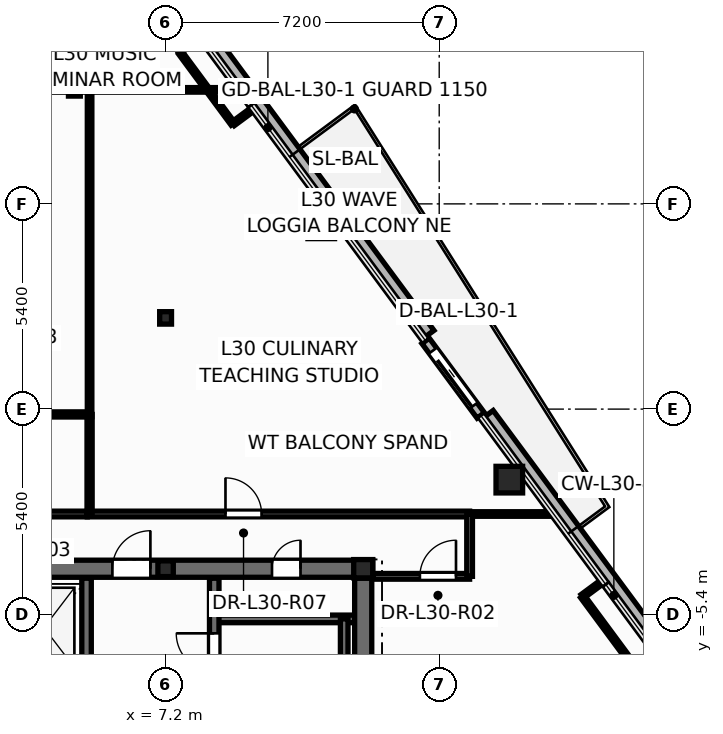
"""IFC4 building model, lengths in metres.
Left out: names, types, materials, properties, quantities, classifications, styles, units other than length and angle.
Written with IfcOpenShell. Run it as: python <this file> out.ifc"""

import sys

from ifc_helpers import new_model, si_unit, direction, frame, frame_2d, origin, origin_2d, place, context, subcontext, project, spatial, rectangle, hollow_circle, i_section, extrude, element, fill, save


model = new_model("IFC4")
c1 = context("Model", 3, precision=1e-05, world=origin(), true_north=direction((0.0, 1.0)))
c2 = subcontext(c1, "Body", "Model", "MODEL_VIEW")
j1 = project(units=[si_unit("LENGTHUNIT", "METRE"), si_unit("PLANEANGLEUNIT", "RADIAN")], contexts=[c1])
p1 = place(None, origin())
s1 = spatial("IfcSite", under=j1, at=p1, CompositionType="ELEMENT")
p2 = place(p1, origin())
s2 = spatial("IfcBuilding", under=s1, at=p2, CompositionType="ELEMENT")
p3 = place(p2, frame((0.0, 0.0, 117.6)))
s3 = spatial("IfcBuildingStorey", under=s2, at=p3, CompositionType="ELEMENT", Elevation=117.6)
for number, where, z_axis, x_axis in (
    (1, (16.245, -1.856, 0.0), (0.0, 0.0, 1.0), (1.0, 0.0, 0.0)),
    (2, (11.296, 4.836, 0.0), (0.0, 0.0, 1.0), (1.0, 0.0, 0.0)),
):
    element("IfcColumn", number, at=place(p3, frame(where, z_axis=z_axis, x_axis=x_axis)), inside=s3, PredefinedType="COLUMN", context=c2, shape_type="SweptSolid", body=[
        extrude(hollow_circle(Radius=0.35, WallThickness=0.03, at=origin_2d()), origin(), (0.0, 0.0, 1.0), 4.5),
    ])
p4 = place(p3, frame((12.4, -4.2, 0.0), z_axis=(0.0, 0.0, 1.0), x_axis=(1.0, 0.0, 0.0)))
e3 = element("IfcColumn", 3, at=p4, inside=s3, PredefinedType="COLUMN", context=c2, shape_type="SweptSolid", body=[
    extrude(i_section(OverallWidth=0.5, OverallDepth=0.482, WebThickness=0.04, FlangeThickness=0.045, at=origin_2d()), origin(), (0.0, 0.0, 1.0), 4.5),
])
p5 = place(p3, frame((7.2, -4.2, 0.0), z_axis=(0.0, 0.0, 1.0), x_axis=(1.0, 0.0, 0.0)))
e4 = element("IfcColumn", 4, at=p5, inside=s3, PredefinedType="PILASTER", context=c2, shape_type="SweptSolid", body=[
    extrude(i_section(OverallWidth=0.405, OverallDepth=0.414, WebThickness=0.022, FlangeThickness=0.032, at=origin_2d()), origin(), (0.0, 0.0, 1.0), 4.5),
])
for number, where, z_axis, x_axis in (
    (5, (7.2, 2.4, 0.0), (0.0, 0.0, 1.0), (1.0, 0.0, 0.0)),
    (6, (4.8, 8.4, 0.0), (0.0, 0.0, 1.0), (1.0, 0.0, 0.0)),
):
    element("IfcColumn", number, at=place(p3, frame(where, z_axis=z_axis, x_axis=x_axis)), inside=s3, PredefinedType="COLUMN", context=c2, shape_type="SweptSolid", body=[
        extrude(i_section(OverallWidth=0.311, OverallDepth=0.327, WebThickness=0.016, FlangeThickness=0.025, at=origin_2d()), origin(), (0.0, 0.0, 1.0), 4.5),
    ])
p6 = place(p3, frame((22.573, -9.47, -0.2), z_axis=(0.0, 0.0, 1.0), x_axis=(-0.594646075154, 0.803987590268, 0.0)))
e7 = element("IfcWall", 7, at=p6, inside=s3, PredefinedType="PARAPET", context=c2, shape_type="SweptSolid", body=[
    extrude(rectangle(XDim=11.601, YDim=0.36, at=frame_2d((5.8, 0.0))), origin(), (0.0, 0.0, 1.0), 0.38),
])
p7 = place(p3, frame((14.117, 1.963, -0.2), z_axis=(0.0, 0.0, 1.0), x_axis=(-0.594628189486, 0.804000818575, 0.0)))
e8 = element("IfcWall", 8, at=p7, inside=s3, PredefinedType="PARAPET", context=c2, shape_type="SweptSolid", body=[
    extrude(rectangle(XDim=13.778, YDim=0.36, at=frame_2d((6.889, 0.0))), origin(), (0.0, 0.0, 1.0), 0.38),
])
p8 = place(p3, frame((15.493, -0.166, -0.015), z_axis=(0.0, 0.0, 1.0), x_axis=(-0.594655490218, 0.803980626603, 0.0)))
e9 = element("IfcWall", 9, at=p8, inside=s3, PredefinedType="STANDARD", context=c2, shape_type="SweptSolid", body=[
    extrude(rectangle(XDim=2.44, YDim=0.24, at=frame_2d((1.22, 0.0))), origin(), (0.0, 0.0, 1.0), 3.707),
])
p9 = place(p8, frame((0.32, 0.0, 0.015)))
e10 = element("IfcOpeningElement", 10, at=p9, cuts=e9, PredefinedType="OPENING", context=c2, shape_type="SweptSolid", body=[
    extrude(rectangle(XDim=1.806, YDim=2.204, at=frame_2d((0.9, 1.102))), frame((0.0, 0.13, 0.0), z_axis=(0.0, -1.0, 0.0), x_axis=(1.0, 0.0, 0.0)), (0.0, 0.0, 1.0), 0.26),
])
p10 = place(p3, frame((-12.65, -4.2, 0.0), z_axis=(0.0, 0.0, 1.0), x_axis=(1.0, 0.0, 0.0)))
e11 = element("IfcWall", 11, at=p10, inside=s3, PredefinedType="SHEAR", context=c2, shape_type="SweptSolid", body=[
    extrude(rectangle(XDim=25.3, YDim=0.45, at=frame_2d((12.65, 0.0))), origin(), (0.0, 0.0, 1.0), 4.5),
])
p11 = place(p10, frame((1.85, 0.0, 0.0)))
e12 = element("IfcOpeningElement", 12, at=p11, cuts=e11, PredefinedType="OPENING", context=c2, shape_type="SweptSolid", body=[
    extrude(rectangle(XDim=0.756, YDim=2.054, at=frame_2d((0.375, 1.027))), frame((0.0, 0.235, 0.0), z_axis=(0.0, -1.0, 0.0), x_axis=(1.0, 0.0, 0.0)), (0.0, 0.0, 1.0), 0.47),
])
p12 = place(p10, frame((22.65, 0.0, 0.0)))
e13 = element("IfcOpeningElement", 13, at=p12, cuts=e11, PredefinedType="OPENING", context=c2, shape_type="SweptSolid", body=[
    extrude(rectangle(XDim=0.756, YDim=2.054, at=frame_2d((0.375, 1.027))), frame((0.0, 0.235, 0.0), z_axis=(0.0, -1.0, 0.0), x_axis=(1.0, 0.0, 0.0)), (0.0, 0.0, 1.0), 0.47),
])
p13 = place(p10, frame((5.85, 0.0, 0.0)))
e14 = element("IfcOpeningElement", 14, at=p13, cuts=e11, PredefinedType="OPENING", context=c2, shape_type="SweptSolid", body=[
    extrude(rectangle(XDim=1.006, YDim=2.104, at=frame_2d((0.5, 1.052))), frame((0.0, 0.235, 0.0), z_axis=(0.0, -1.0, 0.0), x_axis=(1.0, 0.0, 0.0)), (0.0, 0.0, 1.0), 0.47),
])
p14 = place(p10, frame((10.35, 0.0, 0.0)))
e15 = element("IfcOpeningElement", 15, at=p14, cuts=e11, PredefinedType="OPENING", context=c2, shape_type="SweptSolid", body=[
    extrude(rectangle(XDim=1.406, YDim=2.154, at=frame_2d((0.7, 1.077))), frame((0.0, 0.235, 0.0), z_axis=(0.0, -1.0, 0.0), x_axis=(1.0, 0.0, 0.0)), (0.0, 0.0, 1.0), 0.47),
])
p15 = place(p10, frame((18.45, 0.0, 0.0)))
e16 = element("IfcOpeningElement", 16, at=p15, cuts=e11, PredefinedType="OPENING", context=c2, shape_type="SweptSolid", body=[
    extrude(rectangle(XDim=1.006, YDim=2.104, at=frame_2d((0.5, 1.052))), frame((0.0, 0.235, 0.0), z_axis=(0.0, -1.0, 0.0), x_axis=(1.0, 0.0, 0.0)), (0.0, 0.0, 1.0), 0.47),
])
p16 = place(p3, frame((8.48, -5.52, 0.0), z_axis=(0.0, 0.0, 1.0), x_axis=(1.0, 0.0, 0.0)))
e17 = element("IfcWall", 17, at=p16, inside=s3, PredefinedType="SOLIDWALL", context=c2, shape_type="SweptSolid", body=[
    extrude(rectangle(XDim=3.87, YDim=0.2, at=frame_2d((1.935, 0.0))), origin(), (0.0, 0.0, 1.0), 4.5),
])
p17 = place(p3, frame((11.9, -13.1, 0.0), z_axis=(0.0, 0.0, 1.0), x_axis=(0.0, 1.0, 0.0)))
e18 = element("IfcWall", 18, at=p17, inside=s3, PredefinedType="SOLIDWALL", context=c2, shape_type="SweptSolid", body=[
    extrude(rectangle(XDim=7.58, YDim=0.2, at=frame_2d((3.79, 0.0))), origin(), (0.0, 0.0, 1.0), 4.5),
])
p18 = place(p3, frame((8.48, -13.85, 0.0), z_axis=(0.0, 0.0, 1.0), x_axis=(0.0, 1.0, 0.0)))
e19 = element("IfcWall", 19, at=p18, inside=s3, PredefinedType="SHEAR", context=c2, shape_type="SweptSolid", body=[
    extrude(rectangle(XDim=9.4, YDim=0.25, at=frame_2d((4.7, 0.0))), origin(), (0.0, 0.0, 1.0), 4.5),
])
p19 = place(p18, frame((6.95, 0.0, 0.0)))
e20 = element("IfcOpeningElement", 20, at=p19, cuts=e19, PredefinedType="OPENING", context=c2, shape_type="SweptSolid", body=[
    extrude(rectangle(XDim=1.006, YDim=2.104, at=frame_2d((0.5, 1.052))), frame((0.0, 0.135, 0.0), z_axis=(0.0, -1.0, 0.0), x_axis=(1.0, 0.0, 0.0)), (0.0, 0.0, 1.0), 0.27),
])
p20 = place(p3, frame((5.12, -13.85, 0.0), z_axis=(0.0, 0.0, 1.0), x_axis=(0.0, 1.0, 0.0)))
e21 = element("IfcWall", 21, at=p20, inside=s3, PredefinedType="SHEAR", context=c2, shape_type="SweptSolid", body=[
    extrude(rectangle(XDim=9.4, YDim=0.25, at=frame_2d((4.7, 0.0))), origin(), (0.0, 0.0, 1.0), 4.5),
])
p21 = place(p3, frame((12.4, -13.85, 0.0), z_axis=(0.0, 0.0, 1.0), x_axis=(0.0, 1.0, 0.0)))
e22 = element("IfcWall", 22, at=p21, inside=s3, PredefinedType="SHEAR", context=c2, shape_type="SweptSolid", body=[
    extrude(rectangle(XDim=9.4, YDim=0.45, at=frame_2d((4.7, 0.0))), origin(), (0.0, 0.0, 1.0), 4.5),
])
p22 = place(p3, frame((5.14, -2.76, 0.0), z_axis=(0.0, 0.0, 1.0), x_axis=(1.0, 0.0, 0.0)))
e23 = element("IfcWall", 23, at=p22, inside=s3, PredefinedType="PARTITIONING", context=c2, shape_type="SweptSolid", body=[
    extrude(rectangle(XDim=10.06, YDim=0.15, at=frame_2d((5.03, 0.0))), origin(), (0.0, 0.0, 1.0), 3.225),
])
p23 = place(p22, frame((3.636, 0.0, 0.0)))
e24 = element("IfcOpeningElement", 24, at=p23, cuts=e23, PredefinedType="OPENING", context=c2, shape_type="SweptSolid", body=[
    extrude(rectangle(XDim=0.956, YDim=2.104, at=frame_2d((0.475, 1.052))), frame((0.0, 0.085, 0.0), z_axis=(0.0, -1.0, 0.0), x_axis=(1.0, 0.0, 0.0)), (0.0, 0.0, 1.0), 0.17),
])
p24 = place(p3, frame((5.2, -0.2, 0.0), z_axis=(0.0, 0.0, 1.0), x_axis=(0.0, 1.0, 0.0)))
e25 = element("IfcWall", 25, at=p24, inside=s3, PredefinedType="PARTITIONING", context=c2, shape_type="SweptSolid", body=[
    extrude(rectangle(XDim=8.6, YDim=0.12, at=frame_2d((4.3, 0.0))), origin(), (0.0, 0.0, 1.0), 3.225),
])
p25 = place(p3, frame((2.36, 8.4, 0.0), z_axis=(0.0, 0.0, 1.0), x_axis=(1.0, 0.0, 0.0)))
e26 = element("IfcWall", 26, at=p25, inside=s3, PredefinedType="PARTITIONING", context=c2, shape_type="SweptSolid", body=[
    extrude(rectangle(XDim=6.18, YDim=0.12, at=frame_2d((3.09, 0.0))), origin(), (0.0, 0.0, 1.0), 3.517),
])
p26 = place(p3, frame((2.36, -2.76, 0.0), z_axis=(0.0, 0.0, 1.0), x_axis=(1.0, 0.0, 0.0)))
e27 = element("IfcWall", 27, at=p26, inside=s3, PredefinedType="PARTITIONING", context=c2, shape_type="SweptSolid", body=[
    extrude(rectangle(XDim=2.778, YDim=0.15, at=frame_2d((1.389, 0.0))), origin(), (0.0, 0.0, 1.0), 3.819),
])
p27 = place(p26, frame((0.359, 0.0, 0.0)))
e28 = element("IfcOpeningElement", 28, at=p27, cuts=e27, PredefinedType="OPENING", context=c2, shape_type="SweptSolid", body=[
    extrude(rectangle(XDim=0.956, YDim=2.104, at=frame_2d((0.475, 1.052))), frame((0.0, 0.085, 0.0), z_axis=(0.0, -1.0, 0.0), x_axis=(1.0, 0.0, 0.0)), (0.0, 0.0, 1.0), 0.17),
])
p28 = place(p3, frame((2.36, -0.14, 0.0), z_axis=(0.0, 0.0, 1.0), x_axis=(1.0, 0.0, 0.0)))
e29 = element("IfcWall", 29, at=p28, inside=s3, PredefinedType="PARTITIONING", context=c2, shape_type="SweptSolid", body=[
    extrude(rectangle(XDim=2.84, YDim=0.135, at=frame_2d((1.42, 0.0))), origin(), (0.0, 0.0, 1.0), 3.819),
])
p29 = place(p3, frame((12.652, -4.4, 0.0), z_axis=(0.0, 0.0, 1.0), x_axis=(1.0, 0.0, 0.0)))
e30 = element("IfcWall", 30, at=p29, inside=s3, PredefinedType="PARTITIONING", context=c2, shape_type="SweptSolid", body=[
    extrude(rectangle(XDim=2.548, YDim=0.15, at=frame_2d((1.274, 0.0))), origin(), (0.0, 0.0, 1.0), 3.225),
])
p30 = place(p29, frame((1.24, 0.0, 0.0)))
e31 = element("IfcOpeningElement", 31, at=p30, cuts=e30, PredefinedType="OPENING", context=c2, shape_type="SweptSolid", body=[
    extrude(rectangle(XDim=0.956, YDim=2.104, at=frame_2d((0.475, 1.052))), frame((0.0, 0.085, 0.0), z_axis=(0.0, -1.0, 0.0), x_axis=(1.0, 0.0, 0.0)), (0.0, 0.0, 1.0), 0.17),
])
p31 = place(p3, frame((5.2, -2.76, 0.0), z_axis=(0.0, 0.0, 1.0), x_axis=(0.0, 1.0, 0.0)))
e32 = element("IfcWall", 32, at=p31, inside=s3, PredefinedType="PARTITIONING", context=c2, shape_type="SweptSolid", body=[
    extrude(rectangle(XDim=2.62, YDim=0.135, at=frame_2d((1.31, 0.0))), origin(), (0.0, 0.0, 1.0), 4.25),
])
p32 = place(p3, frame((19.55, -6.795, 0.0), z_axis=(0.0, 0.0, 1.0), x_axis=(-0.594589014846, 0.804029790135, 0.0)))
e33 = element("IfcWall", 33, at=p32, inside=s3, PredefinedType="PARTITIONING", context=c2, shape_type="SweptSolid", body=[
    extrude(rectangle(XDim=2.323, YDim=0.12, at=frame_2d((1.162, 0.0))), origin(), (0.0, 0.0, 1.0), 4.25),
])
p33 = place(p3, frame((8.973, 7.506, 0.0), z_axis=(0.0, 0.0, 1.0), x_axis=(-0.594639257158, 0.803992632955, 0.0)))
e34 = element("IfcWall", 34, at=p33, inside=s3, PredefinedType="PARTITIONING", context=c2, shape_type="SweptSolid", body=[
    extrude(rectangle(XDim=2.323, YDim=0.12, at=frame_2d((1.162, 0.0))), origin(), (0.0, 0.0, 1.0), 4.25),
])
p34 = place(p3, frame((15.2, -2.76, 0.0), z_axis=(0.0, 0.0, 1.0), x_axis=(1.0, 0.0, 0.0)))
e35 = element("IfcWall", 35, at=p34, inside=s3, PredefinedType="PARTITIONING", context=c2, shape_type="SweptSolid", body=[
    extrude(rectangle(XDim=2.211, YDim=0.12, at=frame_2d((1.106, 0.0))), origin(), (0.0, 0.0, 1.0), 3.692),
])
p35 = place(p3, frame((15.2, -4.4, 0.0), z_axis=(0.0, 0.0, 1.0), x_axis=(0.0, 1.0, 0.0)))
e36 = element("IfcWall", 36, at=p35, inside=s3, PredefinedType="PARTITIONING", context=c2, shape_type="SweptSolid", body=[
    extrude(rectangle(XDim=1.64, YDim=0.15, at=frame_2d((0.82, 0.0))), origin(), (0.0, 0.0, 1.0), 4.25),
])
p36 = place(p3, frame((7.591, 9.374, 0.0), z_axis=(0.0, 0.0, 1.0), x_axis=(0.510934527976, 0.859619629908, 0.0)))
e37 = element("IfcWall", 37, at=p36, inside=s3, PredefinedType="PARTITIONING", context=c2, shape_type="SweptSolid", body=[
    extrude(rectangle(XDim=0.727, YDim=0.12, at=frame_2d((0.363, 0.0))), origin(), (0.0, 0.0, 1.0), 3.692),
])
p37 = place(p3, frame((9.511, 7.904, 0.0), z_axis=(0.0, 0.0, 1.0), x_axis=(-0.804221577226, -0.594329584257, 0.0)))
e38 = element("IfcWall", 38, at=p37, inside=s3, PredefinedType="PARTITIONING", context=c2, shape_type="SweptSolid", body=[
    extrude(rectangle(XDim=0.67, YDim=0.12, at=frame_2d((0.335, 0.0))), origin(), (0.0, 0.0, 1.0), 3.692),
])
p38 = place(p3, frame((18.168, -4.927, 0.0), z_axis=(0.0, 0.0, 1.0), x_axis=(0.804092805945, 0.59450379261, 0.0)))
e39 = element("IfcWall", 39, at=p38, inside=s3, PredefinedType="PARTITIONING", context=c2, shape_type="SweptSolid", body=[
    extrude(rectangle(XDim=0.67, YDim=0.12, at=frame_2d((0.335, 0.0))), origin(), (0.0, 0.0, 1.0), 3.692),
])
p39 = place(p9, origin())
e40 = element("IfcDoor", 40, at=p39, inside=s3, OperationType="SLIDING_TO_LEFT", PredefinedType="DOOR", context=c2, shape_type="SweptSolid", body=[
    extrude(rectangle(XDim=1.8, YDim=2.2, at=frame_2d((0.9, 1.1))), frame((0.0, 0.025, 0.0), z_axis=(0.0, -1.0, 0.0), x_axis=(1.0, 0.0, 0.0)), (0.0, 0.0, 1.0), 0.05),
])
fill(e10, e40)
p40 = place(p19, origin())
e41 = element("IfcDoor", 41, at=p40, inside=s3, OperationType="SINGLE_SWING_RIGHT", PredefinedType="DOOR", context=c2, shape_type="SweptSolid", body=[
    extrude(rectangle(XDim=1.0, YDim=2.1, at=frame_2d((0.5, 1.05))), frame((0.0, 0.025, 0.0), z_axis=(0.0, -1.0, 0.0), x_axis=(1.0, 0.0, 0.0)), (0.0, 0.0, 1.0), 0.05),
])
fill(e20, e41)
p41 = place(p12, origin())
e42 = element("IfcDoor", 42, at=p41, inside=s3, OperationType="SINGLE_SWING_RIGHT", PredefinedType="DOOR", context=c2, shape_type="SweptSolid", body=[
    extrude(rectangle(XDim=0.75, YDim=2.05, at=frame_2d((0.375, 1.025))), frame((0.0, 0.025, 0.0), z_axis=(0.0, -1.0, 0.0), x_axis=(1.0, 0.0, 0.0)), (0.0, 0.0, 1.0), 0.05),
])
fill(e13, e42)
p42 = place(p15, origin())
e43 = element("IfcDoor", 43, at=p42, inside=s3, OperationType="SINGLE_SWING_RIGHT", PredefinedType="DOOR", context=c2, shape_type="SweptSolid", body=[
    extrude(rectangle(XDim=1.0, YDim=2.1, at=frame_2d((0.5, 1.05))), frame((0.0, 0.025, 0.0), z_axis=(0.0, -1.0, 0.0), x_axis=(1.0, 0.0, 0.0)), (0.0, 0.0, 1.0), 0.05),
])
fill(e16, e43)
p43 = place(p30, origin())
e44 = element("IfcDoor", 44, at=p43, inside=s3, OperationType="SINGLE_SWING_RIGHT", PredefinedType="DOOR", context=c2, shape_type="SweptSolid", body=[
    extrude(rectangle(XDim=0.95, YDim=2.1, at=frame_2d((0.475, 1.05))), frame((0.0, 0.025, 0.0), z_axis=(0.0, -1.0, 0.0), x_axis=(1.0, 0.0, 0.0)), (0.0, 0.0, 1.0), 0.05),
])
fill(e31, e44)
p44 = place(p23, origin())
e45 = element("IfcDoor", 45, at=p44, inside=s3, OperationType="SINGLE_SWING_LEFT", PredefinedType="DOOR", context=c2, shape_type="SweptSolid", body=[
    extrude(rectangle(XDim=0.95, YDim=2.1, at=frame_2d((0.475, 1.05))), frame((0.0, 0.025, 0.0), z_axis=(0.0, -1.0, 0.0), x_axis=(1.0, 0.0, 0.0)), (0.0, 0.0, 1.0), 0.05),
])
fill(e24, e45)
save(model, sys.argv[1])
